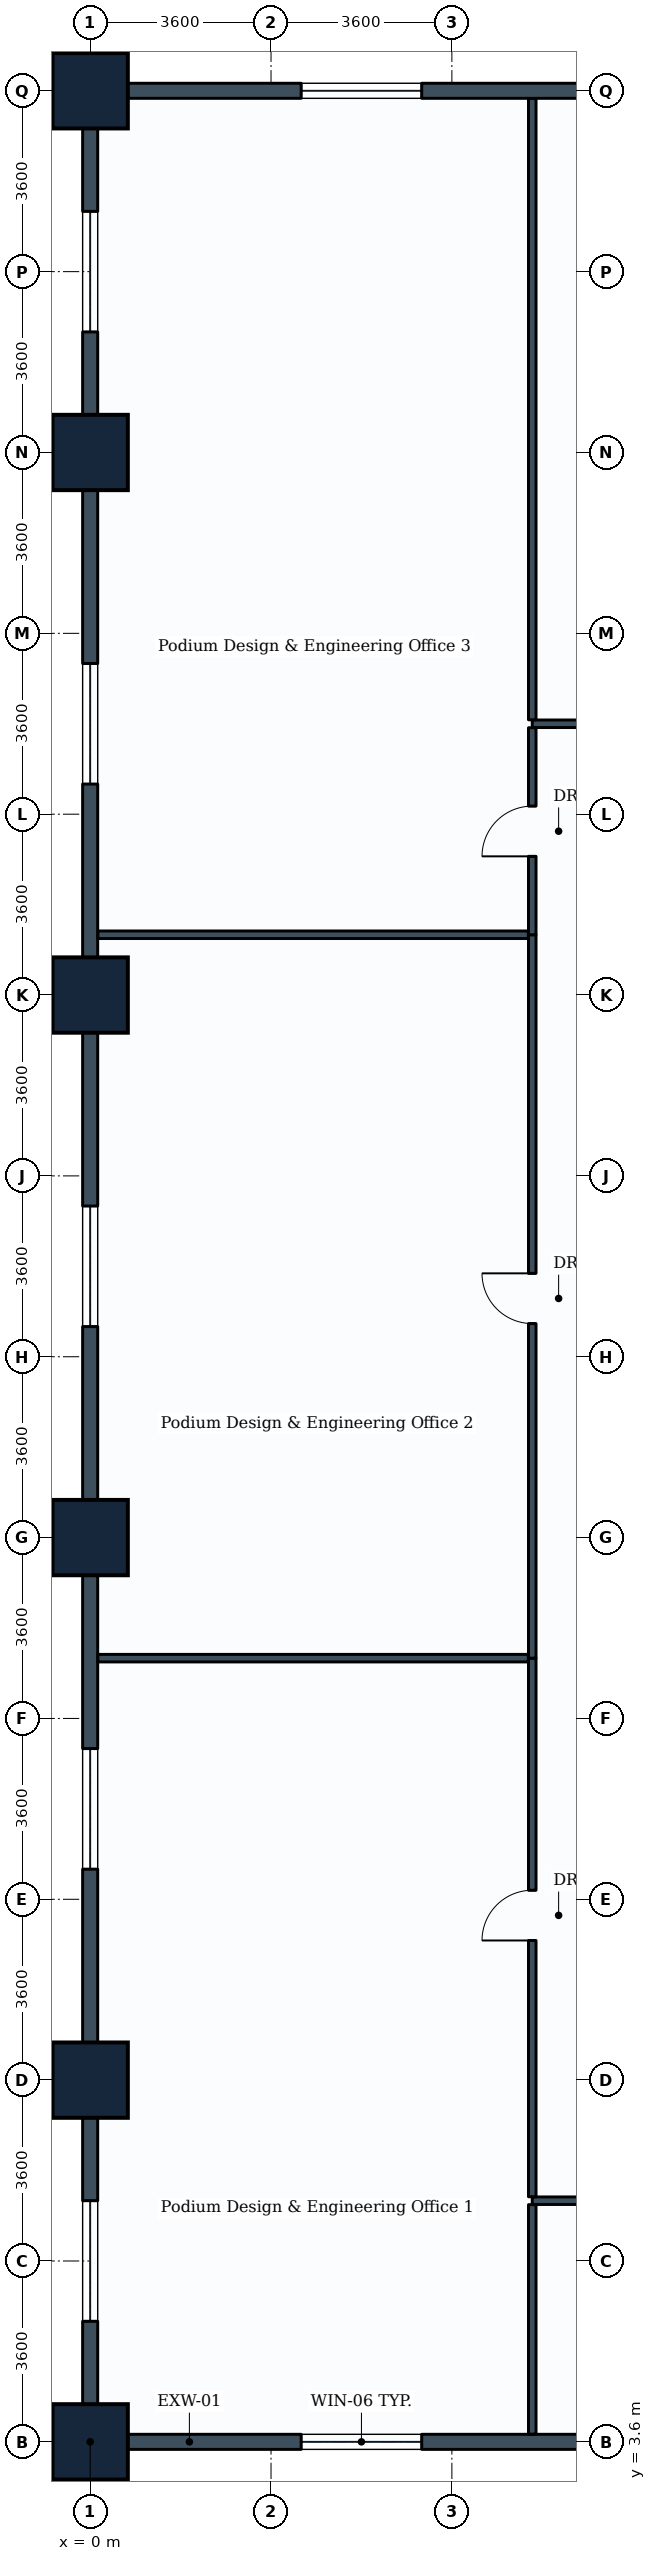
"""IFC4 building model, lengths in metres.
Left out: names, types, materials, properties, quantities, classifications, styles, units other than length and angle.
Written with IfcOpenShell. Run it as: python <this file> out.ifc"""

import sys

from ifc_helpers import new_model, si_unit, direction, frame, frame_2d, origin, origin_2d, place, context, subcontext, project, spatial, rectangle, extrude, element, fill, save


model = new_model("IFC4")
c1 = context("Model", 3, precision=1e-05, world=origin(), true_north=direction((0.0, 1.0)))
c2 = subcontext(c1, "Body", "Model", "MODEL_VIEW")
j1 = project(units=[si_unit("LENGTHUNIT", "METRE"), si_unit("PLANEANGLEUNIT", "RADIAN")], contexts=[c1])
p1 = place(None, origin())
s1 = spatial("IfcSite", under=j1, at=p1, CompositionType="ELEMENT")
p2 = place(p1, origin())
s2 = spatial("IfcBuilding", under=s1, at=p2, CompositionType="ELEMENT")
p3 = place(p2, frame((0.0, 0.0, 19.4)))
s3 = spatial("IfcBuildingStorey", under=s2, at=p3, CompositionType="ELEMENT", Elevation=19.4)
for number, where, z_axis, x_axis in (
    (1, (0.0, 3.6, 0.0), (0.0, 0.0, 1.0), (1.0, 0.0, 0.0)),
    (2, (0.0, 10.8, 0.0), (0.0, 0.0, 1.0), (1.0, 0.0, 0.0)),
    (3, (0.0, 21.6, 0.0), (0.0, 0.0, 1.0), (1.0, 0.0, 0.0)),
    (4, (0.0, 32.4, 0.0), (0.0, 0.0, 1.0), (1.0, 0.0, 0.0)),
    (5, (0.0, 43.2, 0.0), (0.0, 0.0, 1.0), (1.0, 0.0, 0.0)),
    (6, (0.0, 50.4, 0.0), (0.0, 0.0, 1.0), (1.0, 0.0, 0.0)),
):
    element("IfcColumn", number, at=place(p3, frame(where, z_axis=z_axis, x_axis=x_axis)), inside=s3, PredefinedType="COLUMN", context=c2, shape_type="SweptSolid", body=[
        extrude(rectangle(XDim=1.5, YDim=1.5, at=origin_2d()), origin(), (0.0, 0.0, 1.0), 4.6),
    ])
p4 = place(p3, frame((10.8, 3.6, 0.0), z_axis=(0.0, 0.0, 1.0), x_axis=(-1.0, 0.0, 0.0)))
e7 = element("IfcWall", 7, at=p4, inside=s3, PredefinedType="STANDARD", context=c2, shape_type="SweptSolid", body=[
    extrude(rectangle(XDim=10.8, YDim=0.3, at=frame_2d((5.4, 0.0))), origin(), (0.0, 0.0, 1.0), 3.23),
])
p5 = place(p4, frame((4.2, 0.0, 0.85)))
e8 = element("IfcOpeningElement", 8, at=p5, cuts=e7, PredefinedType="OPENING", context=c2, shape_type="SweptSolid", body=[
    extrude(rectangle(XDim=2.4, YDim=1.6, at=frame_2d((1.2, 0.8))), frame((0.0, 0.16, 0.0), z_axis=(0.0, -1.0, 0.0), x_axis=(1.0, 0.0, 0.0)), (0.0, 0.0, 1.0), 0.32),
])
p6 = place(p3, frame((0.0, 50.4, 0.0), z_axis=(0.0, 0.0, 1.0), x_axis=(1.0, 0.0, 0.0)))
e9 = element("IfcWall", 9, at=p6, inside=s3, PredefinedType="STANDARD", context=c2, shape_type="SweptSolid", body=[
    extrude(rectangle(XDim=10.8, YDim=0.3, at=frame_2d((5.4, 0.0))), origin(), (0.0, 0.0, 1.0), 3.23),
])
p7 = place(p6, frame((4.2, 0.0, 0.85)))
e10 = element("IfcOpeningElement", 10, at=p7, cuts=e9, PredefinedType="OPENING", context=c2, shape_type="SweptSolid", body=[
    extrude(rectangle(XDim=2.4, YDim=1.6, at=frame_2d((1.2, 0.8))), frame((0.0, 0.16, 0.0), z_axis=(0.0, -1.0, 0.0), x_axis=(1.0, 0.0, 0.0)), (0.0, 0.0, 1.0), 0.32),
])
p8 = place(p3, frame((0.0, 3.6, 0.0), z_axis=(0.0, 0.0, 1.0), x_axis=(0.0, 1.0, 0.0)))
e11 = element("IfcWall", 11, at=p8, inside=s3, PredefinedType="STANDARD", context=c2, shape_type="SweptSolid", body=[
    extrude(rectangle(XDim=7.2, YDim=0.3, at=frame_2d((3.6, 0.0))), origin(), (0.0, 0.0, 1.0), 3.23),
])
p9 = place(p8, frame((2.4, 0.0, 0.85)))
e12 = element("IfcOpeningElement", 12, at=p9, cuts=e11, PredefinedType="OPENING", context=c2, shape_type="SweptSolid", body=[
    extrude(rectangle(XDim=2.4, YDim=1.6, at=frame_2d((1.2, 0.8))), frame((0.0, 0.16, 0.0), z_axis=(0.0, -1.0, 0.0), x_axis=(1.0, 0.0, 0.0)), (0.0, 0.0, 1.0), 0.32),
])
p10 = place(p3, frame((0.0, 10.8, 0.0), z_axis=(0.0, 0.0, 1.0), x_axis=(0.0, 1.0, 0.0)))
e13 = element("IfcWall", 13, at=p10, inside=s3, PredefinedType="STANDARD", context=c2, shape_type="SweptSolid", body=[
    extrude(rectangle(XDim=10.8, YDim=0.3, at=frame_2d((5.4, 0.0))), origin(), (0.0, 0.0, 1.0), 3.23),
])
p11 = place(p10, frame((4.2, 0.0, 0.85)))
e14 = element("IfcOpeningElement", 14, at=p11, cuts=e13, PredefinedType="OPENING", context=c2, shape_type="SweptSolid", body=[
    extrude(rectangle(XDim=2.4, YDim=1.6, at=frame_2d((1.2, 0.8))), frame((0.0, 0.16, 0.0), z_axis=(0.0, -1.0, 0.0), x_axis=(1.0, 0.0, 0.0)), (0.0, 0.0, 1.0), 0.32),
])
p12 = place(p3, frame((0.0, 21.6, 0.0), z_axis=(0.0, 0.0, 1.0), x_axis=(0.0, 1.0, 0.0)))
e15 = element("IfcWall", 15, at=p12, inside=s3, PredefinedType="STANDARD", context=c2, shape_type="SweptSolid", body=[
    extrude(rectangle(XDim=10.8, YDim=0.3, at=frame_2d((5.4, 0.0))), origin(), (0.0, 0.0, 1.0), 3.23),
])
p13 = place(p12, frame((4.2, 0.0, 0.85)))
e16 = element("IfcOpeningElement", 16, at=p13, cuts=e15, PredefinedType="OPENING", context=c2, shape_type="SweptSolid", body=[
    extrude(rectangle(XDim=2.4, YDim=1.6, at=frame_2d((1.2, 0.8))), frame((0.0, 0.16, 0.0), z_axis=(0.0, -1.0, 0.0), x_axis=(1.0, 0.0, 0.0)), (0.0, 0.0, 1.0), 0.32),
])
p14 = place(p3, frame((0.0, 32.4, 0.0), z_axis=(0.0, 0.0, 1.0), x_axis=(0.0, 1.0, 0.0)))
e17 = element("IfcWall", 17, at=p14, inside=s3, PredefinedType="STANDARD", context=c2, shape_type="SweptSolid", body=[
    extrude(rectangle(XDim=10.8, YDim=0.3, at=frame_2d((5.4, 0.0))), origin(), (0.0, 0.0, 1.0), 3.23),
])
p15 = place(p14, frame((4.2, 0.0, 0.85)))
e18 = element("IfcOpeningElement", 18, at=p15, cuts=e17, PredefinedType="OPENING", context=c2, shape_type="SweptSolid", body=[
    extrude(rectangle(XDim=2.4, YDim=1.6, at=frame_2d((1.2, 0.8))), frame((0.0, 0.16, 0.0), z_axis=(0.0, -1.0, 0.0), x_axis=(1.0, 0.0, 0.0)), (0.0, 0.0, 1.0), 0.32),
])
p16 = place(p3, frame((0.0, 43.2, 0.0), z_axis=(0.0, 0.0, 1.0), x_axis=(0.0, 1.0, 0.0)))
e19 = element("IfcWall", 19, at=p16, inside=s3, PredefinedType="STANDARD", context=c2, shape_type="SweptSolid", body=[
    extrude(rectangle(XDim=7.2, YDim=0.3, at=frame_2d((3.6, 0.0))), origin(), (0.0, 0.0, 1.0), 3.23),
])
p17 = place(p16, frame((2.4, 0.0, 0.85)))
e20 = element("IfcOpeningElement", 20, at=p17, cuts=e19, PredefinedType="OPENING", context=c2, shape_type="SweptSolid", body=[
    extrude(rectangle(XDim=2.4, YDim=1.6, at=frame_2d((1.2, 0.8))), frame((0.0, 0.16, 0.0), z_axis=(0.0, -1.0, 0.0), x_axis=(1.0, 0.0, 0.0)), (0.0, 0.0, 1.0), 0.32),
])
p18 = place(p3, frame((8.8, 8.4, 0.0), z_axis=(0.0, 0.0, 1.0), x_axis=(1.0, 0.0, 0.0)))
e21 = element("IfcWall", 21, at=p18, inside=s3, PredefinedType="PARTITIONING", context=c2, shape_type="SweptSolid", body=[
    extrude(rectangle(XDim=21.2, YDim=0.15, at=frame_2d((10.6, 0.0))), origin(), (0.0, 0.0, 1.0), 3.23),
])
p19 = place(p18, frame((9.241, 0.0, 0.0)))
e22 = element("IfcOpeningElement", 22, at=p19, cuts=e21, PredefinedType="OPENING", context=c2, shape_type="SweptSolid", body=[
    extrude(rectangle(XDim=1.6, YDim=2.2, at=frame_2d((0.8, 1.1))), frame((0.0, 0.085, 0.0), z_axis=(0.0, -1.0, 0.0), x_axis=(1.0, 0.0, 0.0)), (0.0, 0.0, 1.0), 0.17),
])
p20 = place(p3, frame((8.8, 37.8, 0.0), z_axis=(0.0, 0.0, 1.0), x_axis=(1.0, 0.0, 0.0)))
e23 = element("IfcWall", 23, at=p20, inside=s3, PredefinedType="PARTITIONING", context=c2, shape_type="SweptSolid", body=[
    extrude(rectangle(XDim=15.2, YDim=0.15, at=frame_2d((7.6, 0.0))), origin(), (0.0, 0.0, 1.0), 3.23),
])
p21 = place(p20, frame((6.76, 0.0, 0.0)))
e24 = element("IfcOpeningElement", 24, at=p21, cuts=e23, PredefinedType="OPENING", context=c2, shape_type="SweptSolid", body=[
    extrude(rectangle(XDim=1.6, YDim=2.2, at=frame_2d((0.8, 1.1))), frame((0.0, 0.085, 0.0), z_axis=(0.0, -1.0, 0.0), x_axis=(1.0, 0.0, 0.0)), (0.0, 0.0, 1.0), 0.17),
])
p22 = place(p3, frame((8.8, 3.754, 0.0), z_axis=(0.0, 0.0, 1.0), x_axis=(0.0, 1.0, 0.0)))
e25 = element("IfcWall", 25, at=p22, inside=s3, PredefinedType="PARTITIONING", context=c2, shape_type="SweptSolid", body=[
    extrude(rectangle(XDim=4.567, YDim=0.15, at=frame_2d((2.284, 0.0))), origin(), (0.0, 0.0, 1.0), 3.23),
])
p23 = place(p3, frame((8.8, 8.479, 0.0), z_axis=(0.0, 0.0, 1.0), x_axis=(0.0, 1.0, 0.0)))
e26 = element("IfcWall", 26, at=p23, inside=s3, PredefinedType="PARTITIONING", context=c2, shape_type="SweptSolid", body=[
    extrude(rectangle(XDim=10.721, YDim=0.15, at=frame_2d((5.36, 0.0))), origin(), (0.0, 0.0, 1.0), 3.23),
])
p24 = place(p23, frame((5.101, 0.0, 0.0)))
e27 = element("IfcOpeningElement", 27, at=p24, cuts=e26, PredefinedType="OPENING", context=c2, shape_type="SweptSolid", body=[
    extrude(rectangle(XDim=1.0, YDim=2.1, at=frame_2d((0.5, 1.05))), frame((0.0, 0.085, 0.0), z_axis=(0.0, -1.0, 0.0), x_axis=(1.0, 0.0, 0.0)), (0.0, 0.0, 1.0), 0.17),
])
p25 = place(p3, frame((0.154, 19.2, 0.0), z_axis=(0.0, 0.0, 1.0), x_axis=(1.0, 0.0, 0.0)))
e28 = element("IfcWall", 28, at=p25, inside=s3, PredefinedType="PARTITIONING", context=c2, shape_type="SweptSolid", body=[
    extrude(rectangle(XDim=8.567, YDim=0.15, at=frame_2d((4.283, 0.0))), origin(), (0.0, 0.0, 1.0), 3.23),
])
p26 = place(p3, frame((8.8, 19.2, 0.0), z_axis=(0.0, 0.0, 1.0), x_axis=(0.0, 1.0, 0.0)))
e29 = element("IfcWall", 29, at=p26, inside=s3, PredefinedType="PARTITIONING", context=c2, shape_type="SweptSolid", body=[
    extrude(rectangle(XDim=14.4, YDim=0.15, at=frame_2d((7.2, 0.0))), origin(), (0.0, 0.0, 1.0), 3.23),
])
p27 = place(p26, frame((6.66, 0.0, 0.0)))
e30 = element("IfcOpeningElement", 30, at=p27, cuts=e29, PredefinedType="OPENING", context=c2, shape_type="SweptSolid", body=[
    extrude(rectangle(XDim=1.0, YDim=2.1, at=frame_2d((0.5, 1.05))), frame((0.0, 0.085, 0.0), z_axis=(0.0, -1.0, 0.0), x_axis=(1.0, 0.0, 0.0)), (0.0, 0.0, 1.0), 0.17),
])
p28 = place(p3, frame((0.154, 33.6, 0.0), z_axis=(0.0, 0.0, 1.0), x_axis=(1.0, 0.0, 0.0)))
e31 = element("IfcWall", 31, at=p28, inside=s3, PredefinedType="PARTITIONING", context=c2, shape_type="SweptSolid", body=[
    extrude(rectangle(XDim=8.567, YDim=0.15, at=frame_2d((4.283, 0.0))), origin(), (0.0, 0.0, 1.0), 3.23),
])
p29 = place(p3, frame((8.8, 33.6, 0.0), z_axis=(0.0, 0.0, 1.0), x_axis=(0.0, 1.0, 0.0)))
e32 = element("IfcWall", 32, at=p29, inside=s3, PredefinedType="PARTITIONING", context=c2, shape_type="SweptSolid", body=[
    extrude(rectangle(XDim=4.121, YDim=0.15, at=frame_2d((2.061, 0.0))), origin(), (0.0, 0.0, 1.0), 3.59),
])
p30 = place(p29, frame((1.561, 0.0, 0.0)))
e33 = element("IfcOpeningElement", 33, at=p30, cuts=e32, PredefinedType="OPENING", context=c2, shape_type="SweptSolid", body=[
    extrude(rectangle(XDim=1.0, YDim=2.1, at=frame_2d((0.5, 1.05))), frame((0.0, 0.085, 0.0), z_axis=(0.0, -1.0, 0.0), x_axis=(1.0, 0.0, 0.0)), (0.0, 0.0, 1.0), 0.17),
])
p31 = place(p3, frame((8.8, 37.879, 0.0), z_axis=(0.0, 0.0, 1.0), x_axis=(0.0, 1.0, 0.0)))
e34 = element("IfcWall", 34, at=p31, inside=s3, PredefinedType="PARTITIONING", context=c2, shape_type="SweptSolid", body=[
    extrude(rectangle(XDim=12.367, YDim=0.15, at=frame_2d((6.184, 0.0))), origin(), (0.0, 0.0, 1.0), 3.23),
])
p32 = place(p5, origin())
e35 = element("IfcWindow", 35, at=p32, inside=s3, PartitioningType="SINGLE_PANEL", PredefinedType="WINDOW", context=c2, shape_type="SweptSolid", body=[
    extrude(rectangle(XDim=2.4, YDim=1.6, at=frame_2d((1.2, 0.8))), frame((0.0, 0.03, 0.0), z_axis=(0.0, -1.0, 0.0), x_axis=(1.0, 0.0, 0.0)), (0.0, 0.0, 1.0), 0.06),
])
fill(e8, e35)
p33 = place(p7, origin())
e36 = element("IfcWindow", 36, at=p33, inside=s3, PartitioningType="SINGLE_PANEL", PredefinedType="WINDOW", context=c2, shape_type="SweptSolid", body=[
    extrude(rectangle(XDim=2.4, YDim=1.6, at=frame_2d((1.2, 0.8))), frame((0.0, 0.03, 0.0), z_axis=(0.0, -1.0, 0.0), x_axis=(1.0, 0.0, 0.0)), (0.0, 0.0, 1.0), 0.06),
])
fill(e10, e36)
p34 = place(p9, origin())
e37 = element("IfcWindow", 37, at=p34, inside=s3, PartitioningType="SINGLE_PANEL", PredefinedType="WINDOW", context=c2, shape_type="SweptSolid", body=[
    extrude(rectangle(XDim=2.4, YDim=1.6, at=frame_2d((1.2, 0.8))), frame((0.0, 0.03, 0.0), z_axis=(0.0, -1.0, 0.0), x_axis=(1.0, 0.0, 0.0)), (0.0, 0.0, 1.0), 0.06),
])
fill(e12, e37)
p35 = place(p11, origin())
e38 = element("IfcWindow", 38, at=p35, inside=s3, PartitioningType="SINGLE_PANEL", PredefinedType="WINDOW", context=c2, shape_type="SweptSolid", body=[
    extrude(rectangle(XDim=2.4, YDim=1.6, at=frame_2d((1.2, 0.8))), frame((0.0, 0.03, 0.0), z_axis=(0.0, -1.0, 0.0), x_axis=(1.0, 0.0, 0.0)), (0.0, 0.0, 1.0), 0.06),
])
fill(e14, e38)
p36 = place(p13, origin())
e39 = element("IfcWindow", 39, at=p36, inside=s3, PartitioningType="SINGLE_PANEL", PredefinedType="WINDOW", context=c2, shape_type="SweptSolid", body=[
    extrude(rectangle(XDim=2.4, YDim=1.6, at=frame_2d((1.2, 0.8))), frame((0.0, 0.03, 0.0), z_axis=(0.0, -1.0, 0.0), x_axis=(1.0, 0.0, 0.0)), (0.0, 0.0, 1.0), 0.06),
])
fill(e16, e39)
p37 = place(p15, origin())
e40 = element("IfcWindow", 40, at=p37, inside=s3, PartitioningType="SINGLE_PANEL", PredefinedType="WINDOW", context=c2, shape_type="SweptSolid", body=[
    extrude(rectangle(XDim=2.4, YDim=1.6, at=frame_2d((1.2, 0.8))), frame((0.0, 0.03, 0.0), z_axis=(0.0, -1.0, 0.0), x_axis=(1.0, 0.0, 0.0)), (0.0, 0.0, 1.0), 0.06),
])
fill(e18, e40)
p38 = place(p17, origin())
e41 = element("IfcWindow", 41, at=p38, inside=s3, PartitioningType="SINGLE_PANEL", PredefinedType="WINDOW", context=c2, shape_type="SweptSolid", body=[
    extrude(rectangle(XDim=2.4, YDim=1.6, at=frame_2d((1.2, 0.8))), frame((0.0, 0.03, 0.0), z_axis=(0.0, -1.0, 0.0), x_axis=(1.0, 0.0, 0.0)), (0.0, 0.0, 1.0), 0.06),
])
fill(e20, e41)
p39 = place(p24, origin())
e42 = element("IfcDoor", 42, at=p39, inside=s3, OperationType="SINGLE_SWING_LEFT", PredefinedType="DOOR", context=c2, shape_type="SweptSolid", body=[
    extrude(rectangle(XDim=1.0, YDim=2.1, at=frame_2d((0.5, 1.05))), frame((0.0, 0.025, 0.0), z_axis=(0.0, -1.0, 0.0), x_axis=(1.0, 0.0, 0.0)), (0.0, 0.0, 1.0), 0.05),
])
fill(e27, e42)
p40 = place(p27, origin())
e43 = element("IfcDoor", 43, at=p40, inside=s3, OperationType="SINGLE_SWING_RIGHT", PredefinedType="DOOR", context=c2, shape_type="SweptSolid", body=[
    extrude(rectangle(XDim=1.0, YDim=2.1, at=frame_2d((0.5, 1.05))), frame((0.0, 0.025, 0.0), z_axis=(0.0, -1.0, 0.0), x_axis=(1.0, 0.0, 0.0)), (0.0, 0.0, 1.0), 0.05),
])
fill(e30, e43)
p41 = place(p30, origin())
e44 = element("IfcDoor", 44, at=p41, inside=s3, OperationType="SINGLE_SWING_LEFT", PredefinedType="DOOR", context=c2, shape_type="SweptSolid", body=[
    extrude(rectangle(XDim=1.0, YDim=2.1, at=frame_2d((0.5, 1.05))), frame((0.0, 0.025, 0.0), z_axis=(0.0, -1.0, 0.0), x_axis=(1.0, 0.0, 0.0)), (0.0, 0.0, 1.0), 0.05),
])
fill(e33, e44)
save(model, sys.argv[1])
